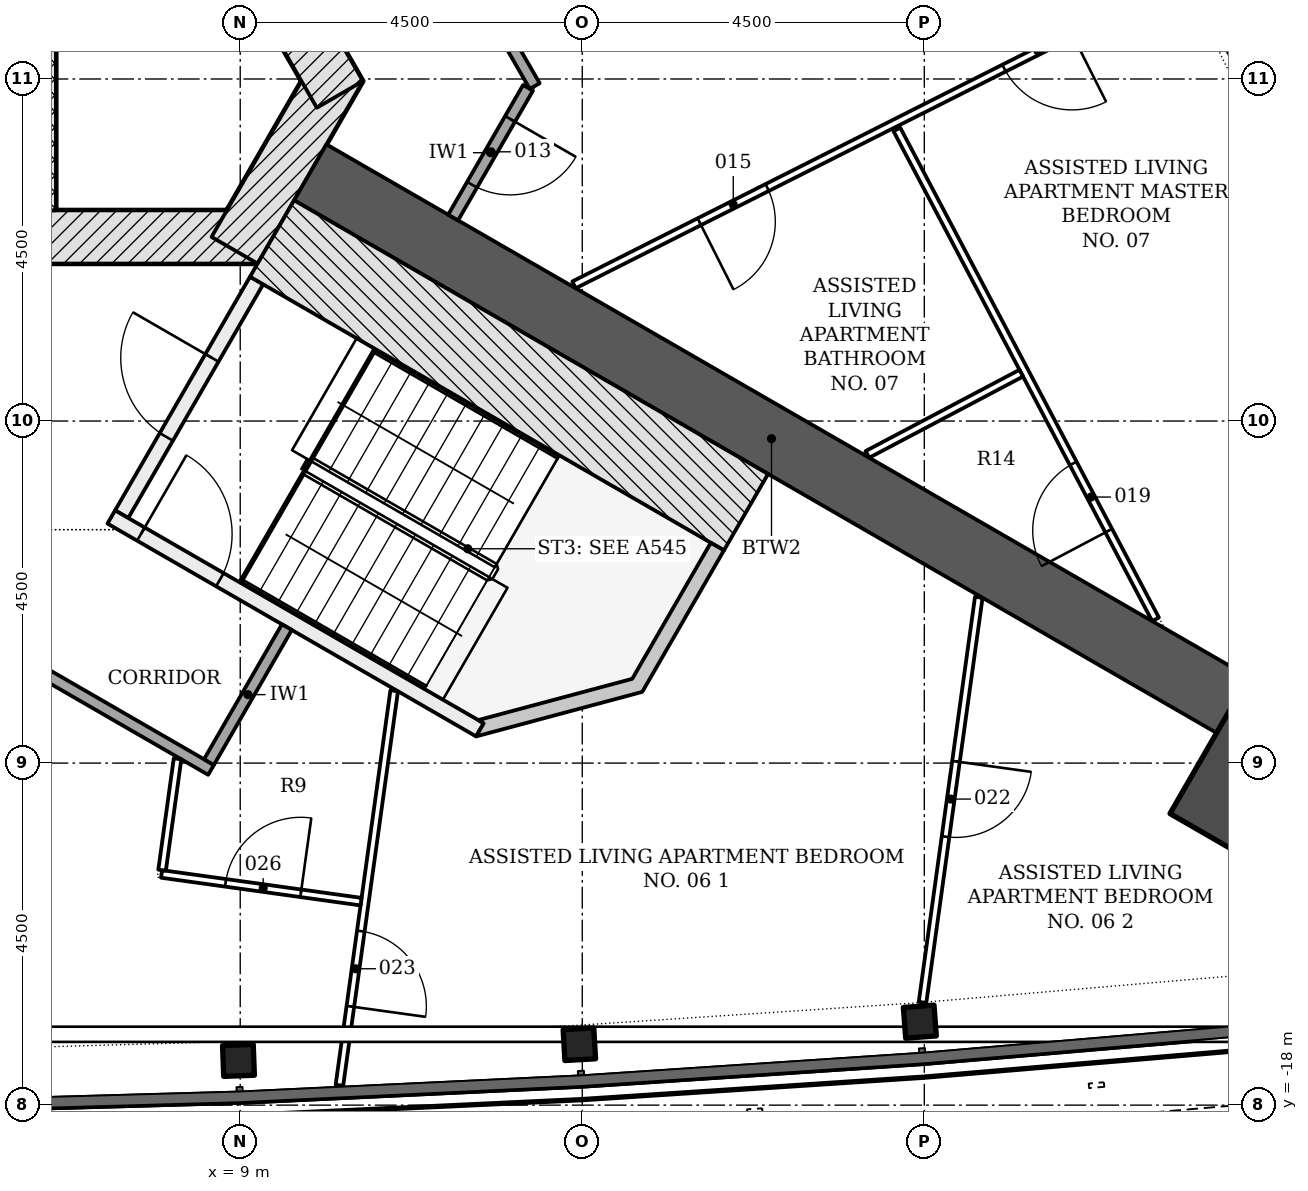
"""IFC4 building model, lengths in metres.
Left out: names, types, materials, properties, quantities, classifications, styles, units other than length and angle.
Written with IfcOpenShell. Run it as: python <this file> out.ifc"""

import sys

from ifc_helpers import new_model, si_unit, direction, frame, frame_2d, origin, origin_2d, place, context, subcontext, project, spatial, polyline, rectangle, i_section, outline, extrude, element, fill, save


model = new_model("IFC4")
c1 = context("Model", 3, precision=1e-05, world=origin(), true_north=direction((0.0, 1.0)))
c2 = subcontext(c1, "Body", "Model", "MODEL_VIEW")
j1 = project(units=[si_unit("LENGTHUNIT", "METRE"), si_unit("PLANEANGLEUNIT", "RADIAN")], contexts=[c1])
p1 = place(None, origin())
s1 = spatial("IfcSite", under=j1, at=p1, CompositionType="ELEMENT")
p2 = place(p1, origin())
s2 = spatial("IfcBuilding", under=s1, at=p2, CompositionType="ELEMENT")
p3 = place(p2, frame((0.0, 0.0, 45.6)))
s3 = spatial("IfcBuildingStorey", under=s2, at=p3, CompositionType="ELEMENT", Elevation=45.6)
p4 = place(p3, frame((-9.229, -6.578, -0.2), z_axis=(0.0, 0.0, 1.0), x_axis=(1.0, 0.0, 0.0)))
e1 = element("IfcWall", 1, at=p4, inside=s3, PredefinedType="SHEAR", context=c2, shape_type="SweptSolid", body=[
    extrude(rectangle(XDim=18.458, YDim=0.7, at=frame_2d((9.229, 0.0))), origin(), (0.0, 0.0, 1.0), 3.6),
])
p5 = place(p4, frame((3.304, 0.0, 0.2)))
e2 = element("IfcOpeningElement", 2, at=p5, cuts=e1, PredefinedType="OPENING", context=c2, shape_type="SweptSolid", body=[
    extrude(rectangle(XDim=1.1, YDim=2.1, at=frame_2d((0.55, 1.05))), frame((0.0, 0.36, 0.0), z_axis=(0.0, -1.0, 0.0), x_axis=(1.0, 0.0, 0.0)), (0.0, 0.0, 1.0), 0.72),
])
p6 = place(p4, frame((5.454, 0.0, 0.2)))
e3 = element("IfcOpeningElement", 3, at=p6, cuts=e1, PredefinedType="OPENING", context=c2, shape_type="SweptSolid", body=[
    extrude(rectangle(XDim=1.1, YDim=2.1, at=frame_2d((0.55, 1.05))), frame((0.0, 0.36, 0.0), z_axis=(0.0, -1.0, 0.0), x_axis=(1.0, 0.0, 0.0)), (0.0, 0.0, 1.0), 0.72),
])
p7 = place(p4, frame((7.604, 0.0, 0.2)))
e4 = element("IfcOpeningElement", 4, at=p7, cuts=e1, PredefinedType="OPENING", context=c2, shape_type="SweptSolid", body=[
    extrude(rectangle(XDim=1.1, YDim=2.1, at=frame_2d((0.55, 1.05))), frame((0.0, 0.36, 0.0), z_axis=(0.0, -1.0, 0.0), x_axis=(1.0, 0.0, 0.0)), (0.0, 0.0, 1.0), 0.72),
])
p8 = place(p4, frame((9.754, 0.0, 0.2)))
e5 = element("IfcOpeningElement", 5, at=p8, cuts=e1, PredefinedType="OPENING", context=c2, shape_type="SweptSolid", body=[
    extrude(rectangle(XDim=1.1, YDim=2.1, at=frame_2d((0.55, 1.05))), frame((0.0, 0.36, 0.0), z_axis=(0.0, -1.0, 0.0), x_axis=(1.0, 0.0, 0.0)), (0.0, 0.0, 1.0), 0.72),
])
p9 = place(p4, frame((11.904, 0.0, 0.2)))
e6 = element("IfcOpeningElement", 6, at=p9, cuts=e1, PredefinedType="OPENING", context=c2, shape_type="SweptSolid", body=[
    extrude(rectangle(XDim=1.1, YDim=2.1, at=frame_2d((0.55, 1.05))), frame((0.0, 0.36, 0.0), z_axis=(0.0, -1.0, 0.0), x_axis=(1.0, 0.0, 0.0)), (0.0, 0.0, 1.0), 0.72),
])
p10 = place(p4, frame((14.054, 0.0, 0.2)))
e7 = element("IfcOpeningElement", 7, at=p10, cuts=e1, PredefinedType="OPENING", context=c2, shape_type="SweptSolid", body=[
    extrude(rectangle(XDim=1.1, YDim=2.1, at=frame_2d((0.55, 1.05))), frame((0.0, 0.36, 0.0), z_axis=(0.0, -1.0, 0.0), x_axis=(1.0, 0.0, 0.0)), (0.0, 0.0, 1.0), 0.72),
])
p11 = place(p4, frame((1.029, 0.0, 0.2)))
e8 = element("IfcOpeningElement", 8, at=p11, cuts=e1, PredefinedType="OPENING", context=c2, shape_type="SweptSolid", body=[
    extrude(rectangle(XDim=1.0, YDim=2.1, at=frame_2d((0.5, 1.05))), frame((0.0, 0.36, 0.0), z_axis=(0.0, -1.0, 0.0), x_axis=(1.0, 0.0, 0.0)), (0.0, 0.0, 1.0), 0.72),
])
p12 = place(p3, frame((8.926, -6.753, -0.2), z_axis=(0.0, 0.0, 1.0), x_axis=(0.500042739161, 0.866000726912, 0.0)))
e9 = element("IfcWall", 9, at=p12, inside=s3, PredefinedType="SHEAR", context=c2, shape_type="SweptSolid", body=[
    extrude(rectangle(XDim=2.771, YDim=0.7, at=frame_2d((1.386, 0.0))), origin(), (0.0, 0.0, 1.0), 3.6),
])
p13 = place(p3, frame((10.311, -4.703, -0.2), z_axis=(0.0, 0.0, 1.0), x_axis=(-0.500001446645, 0.866024568562, 0.0)))
e10 = element("IfcWall", 10, at=p13, inside=s3, PredefinedType="SHEAR", context=c2, shape_type="SweptSolid", body=[
    extrude(rectangle(XDim=18.458, YDim=0.7, at=frame_2d((9.229, 0.0))), origin(), (0.0, 0.0, 1.0), 3.6),
])
p14 = place(p13, frame((10.5, 0.0, 0.2)))
e11 = element("IfcOpeningElement", 11, at=p14, cuts=e10, PredefinedType="OPENING", context=c2, shape_type="SweptSolid", body=[
    extrude(rectangle(XDim=1.0, YDim=2.1, at=frame_2d((0.5, 1.05))), frame((0.0, 0.36, 0.0), z_axis=(0.0, -1.0, 0.0), x_axis=(1.0, 0.0, 0.0)), (0.0, 0.0, 1.0), 0.72),
])
p15 = place(p13, frame((4.877, 0.0, 0.2)))
e12 = element("IfcOpeningElement", 12, at=p15, cuts=e10, PredefinedType="OPENING", context=c2, shape_type="SweptSolid", body=[
    extrude(rectangle(XDim=0.9, YDim=2.1, at=frame_2d((0.45, 1.05))), frame((0.0, 0.36, 0.0), z_axis=(0.0, -1.0, 0.0), x_axis=(1.0, 0.0, 0.0)), (0.0, 0.0, 1.0), 0.72),
])
p16 = place(p13, frame((14.452, 0.0, 0.2)))
e13 = element("IfcOpeningElement", 13, at=p16, cuts=e10, PredefinedType="OPENING", context=c2, shape_type="SweptSolid", body=[
    extrude(rectangle(XDim=0.9, YDim=2.1, at=frame_2d((0.45, 1.05))), frame((0.0, 0.36, 0.0), z_axis=(0.0, -1.0, 0.0), x_axis=(1.0, 0.0, 0.0)), (0.0, 0.0, 1.0), 0.72),
])
p17 = place(p3, frame((9.922, -5.728, -0.2), z_axis=(0.0, 0.0, 1.0), x_axis=(0.866021666006, -0.500006473966, 0.0)))
e14 = element("IfcWall", 14, at=p17, inside=s3, PredefinedType="SHEAR", context=c2, shape_type="SweptSolid", body=[
    extrude(rectangle(XDim=14.013, YDim=0.85, at=frame_2d((7.007, 0.0))), origin(), (0.0, 0.0, 1.0), 3.6),
])
p18 = place(p3, frame((23.487, -13.56, -0.2), z_axis=(0.0, 0.0, 1.0), x_axis=(0.866025403784, -0.5, 0.0)))
e15 = element("IfcColumn", 15, at=p18, inside=s3, PredefinedType="COLUMN", context=c2, shape_type="SweptSolid", body=[
    extrude(rectangle(XDim=3.3, YDim=3.3, at=origin_2d()), origin(), (0.0, 0.0, 1.0), 3.6),
])
for number, where, z_axis, x_axis in (
    (16, (8.977, -17.411, -0.2), (0.0, 0.0, 1.0), (0.999, 0.038, 0.0)),
    (17, (13.462, -17.199, -0.2), (0.0, 0.0, 1.0), (0.998, 0.057, 0.0)),
    (18, (17.941, -16.902, -0.2), (0.0, 0.0, 1.0), (0.997, 0.076, 0.0)),
):
    element("IfcColumn", number, at=place(p3, frame(where, z_axis=z_axis, x_axis=x_axis)), inside=s3, PredefinedType="COLUMN", context=c2, shape_type="SweptSolid", body=[
        extrude(i_section(OverallWidth=0.404, OverallDepth=0.406, WebThickness=0.027, FlangeThickness=0.044, FilletRadius=0.015, at=origin_2d()), origin(), (0.0, 0.0, 1.0), 3.6),
    ])
p19 = place(p3, frame((6.45, -6.228, -0.2), z_axis=(0.0, 0.0, 1.0), x_axis=(0.0, 1.0, 0.0)))
e19 = element("IfcWall", 19, at=p19, inside=s3, PredefinedType="PARTITIONING", context=c2, shape_type="SweptSolid", body=[
    extrude(rectangle(XDim=2.5, YDim=0.25, at=frame_2d((1.25, 0.0))), origin(), (0.0, 0.0, 1.0), 3.6),
])
p20 = place(p3, frame((7.44, -10.226, -0.2), z_axis=(0.0, 0.0, 1.0), x_axis=(0.500022077904, 0.866012656725, 0.0)))
e20 = element("IfcWall", 20, at=p20, inside=s3, PredefinedType="SHEAR", context=c2, shape_type="SweptSolid", body=[
    extrude(rectangle(XDim=3.55, YDim=0.2, at=frame_2d((1.775, 0.0))), origin(), (0.0, 0.0, 1.0), 3.6),
])
p21 = place(p20, frame((1.175, 0.0, 0.2)))
e21 = element("IfcOpeningElement", 21, at=p21, cuts=e20, PredefinedType="OPENING", context=c2, shape_type="SweptSolid", body=[
    extrude(rectangle(XDim=1.2, YDim=2.1, at=frame_2d((0.6, 1.05))), frame((0.0, 0.11, 0.0), z_axis=(0.0, -1.0, 0.0), x_axis=(1.0, 0.0, 0.0)), (0.0, 0.0, 1.0), 0.22),
])
p22 = place(p3, frame((7.304, -10.262, -0.2), z_axis=(0.0, 0.0, 1.0), x_axis=(0.866026594901, -0.49999793692, 0.0)))
e22 = element("IfcWall", 22, at=p22, inside=s3, PredefinedType="SHEAR", context=c2, shape_type="SweptSolid", body=[
    extrude(rectangle(XDim=5.6, YDim=0.2, at=frame_2d((2.8, 0.0))), origin(), (0.0, 0.0, 1.0), 3.6),
])
p23 = place(p22, frame((0.45, 0.0, 0.2)))
e23 = element("IfcOpeningElement", 23, at=p23, cuts=e22, PredefinedType="OPENING", context=c2, shape_type="SweptSolid", body=[
    extrude(rectangle(XDim=1.2, YDim=2.1, at=frame_2d((0.6, 1.05))), frame((0.0, 0.11, 0.0), z_axis=(0.0, -1.0, 0.0), x_axis=(1.0, 0.0, 0.0)), (0.0, 0.0, 1.0), 0.22),
])
p24 = place(p3, frame((9.419, -6.599, -0.2), z_axis=(0.0, 0.0, 1.0), x_axis=(0.866033125095, -0.499986626058, 0.0)))
e24 = element("IfcWall", 24, at=p24, inside=s3, PredefinedType="SHEAR", context=c2, shape_type="SweptSolid", body=[
    extrude(rectangle(XDim=7.2, YDim=1.161, at=frame_2d((3.6, 0.0))), origin(), (0.0, 0.0, 1.0), 3.6),
])
p25 = place(p3, frame((0.0, 0.0, -0.2)))
e25 = element("IfcWall", 25, at=p25, inside=s3, PredefinedType="SHEAR", context=c2, shape_type="SweptSolid", body=[
    extrude(outline(polyline([(12.104, -13.149), (14.289, -12.563), (15.364, -10.701), (15.191, -10.601), (14.157, -12.392), (12.132, -12.934), (12.204, -12.976), (12.204, -12.976), (12.204, -12.976), (12.204, -12.976), (12.204, -12.976), (12.204, -12.976), (12.204, -12.976), (12.204, -12.976), (12.204, -12.976), (12.204, -12.976), (12.204, -12.976), (12.204, -12.976), (12.204, -12.976), (12.204, -12.976), (12.204, -12.976), (12.204, -12.976), (12.204, -12.976), (12.104, -13.149)])), origin(), (0.0, 0.0, 1.0), 3.6),
])
p26 = place(p3, frame((5.346, 8.446, 0.0), z_axis=(0.0, 0.0, 1.0), x_axis=(0.500008781656, -0.866020333634, 0.0)))
e26 = element("IfcWall", 26, at=p26, inside=s3, PredefinedType="PARTITIONING", context=c2, shape_type="SweptSolid", body=[
    extrude(rectangle(XDim=15.057, YDim=0.15, at=frame_2d((7.528, 0.0))), origin(), (0.0, 0.0, 1.0), 2.778),
])
p27 = place(p26, frame((9.446, 0.0, 0.0)))
e27 = element("IfcOpeningElement", 27, at=p27, cuts=e26, PredefinedType="OPENING", context=c2, shape_type="SweptSolid", body=[
    extrude(rectangle(XDim=1.0, YDim=2.1, at=frame_2d((0.5, 1.05))), frame((0.0, 0.085, 0.0), z_axis=(0.0, -1.0, 0.0), x_axis=(1.0, 0.0, 0.0)), (0.0, 0.0, 1.0), 0.17),
])
p28 = place(p26, frame((1.892, 0.0, 0.0)))
e28 = element("IfcOpeningElement", 28, at=p28, cuts=e26, PredefinedType="OPENING", context=c2, shape_type="SweptSolid", body=[
    extrude(rectangle(XDim=1.0, YDim=2.1, at=frame_2d((0.5, 1.05))), frame((0.0, 0.085, 0.0), z_axis=(0.0, -1.0, 0.0), x_axis=(1.0, 0.0, 0.0)), (0.0, 0.0, 1.0), 0.17),
])
p29 = place(p3, frame((8.616, -13.589, 0.0), z_axis=(0.0, 0.0, 1.0), x_axis=(-0.866039313704, 0.499975906538, 0.0)))
e29 = element("IfcWall", 29, at=p29, inside=s3, PredefinedType="PARTITIONING", context=c2, shape_type="SweptSolid", body=[
    extrude(rectangle(XDim=5.892, YDim=0.15, at=frame_2d((2.946, 0.0))), origin(), (0.0, 0.0, 1.0), 2.778),
])
p30 = place(p29, frame((2.649, 0.0, 0.0)))
e30 = element("IfcOpeningElement", 30, at=p30, cuts=e29, PredefinedType="OPENING", context=c2, shape_type="SweptSolid", body=[
    extrude(rectangle(XDim=1.0, YDim=2.1, at=frame_2d((0.5, 1.05))), frame((0.0, 0.085, 0.0), z_axis=(0.0, -1.0, 0.0), x_axis=(1.0, 0.0, 0.0)), (0.0, 0.0, 1.0), 0.17),
])
p31 = place(p3, frame((8.589, -13.487, 0.0), z_axis=(0.0, 0.0, 1.0), x_axis=(0.499956128963, 0.866050731258, 0.0)))
e31 = element("IfcWall", 31, at=p31, inside=s3, PredefinedType="PARTITIONING", context=c2, shape_type="SweptSolid", body=[
    extrude(rectangle(XDim=2.05, YDim=0.15, at=frame_2d((1.025, 0.0))), origin(), (0.0, 0.0, 1.0), 2.923),
])
p32 = place(p3, frame((12.786, -4.617, 0.0), z_axis=(0.0, 0.0, 1.0), x_axis=(-0.500058665202, -0.865991530765, 0.0)))
e32 = element("IfcWall", 32, at=p32, inside=s3, PredefinedType="PARTITIONING", context=c2, shape_type="SweptSolid", body=[
    extrude(rectangle(XDim=1.969, YDim=0.15, at=frame_2d((0.985, 0.0))), origin(), (0.0, 0.0, 1.0), 3.4),
])
p33 = place(p32, frame((0.471, 0.0, 0.0)))
e33 = element("IfcOpeningElement", 33, at=p33, cuts=e32, PredefinedType="OPENING", context=c2, shape_type="SweptSolid", body=[
    extrude(rectangle(XDim=1.0, YDim=2.1, at=frame_2d((0.5, 1.05))), frame((0.0, 0.085, 0.0), z_axis=(0.0, -1.0, 0.0), x_axis=(1.0, 0.0, 0.0)), (0.0, 0.0, 1.0), 0.17),
])
p34 = place(p3, frame((21.402, -3.171, 0.0), z_axis=(0.0, 0.0, 1.0), x_axis=(-0.892974760713, -0.450106739263, 0.0)))
e34 = element("IfcWall", 34, at=p34, inside=s3, PredefinedType="PARTITIONING", context=c2, shape_type="SweptSolid", body=[
    extrude(rectangle(XDim=8.971, YDim=0.1, at=frame_2d((4.486, 0.0))), origin(), (0.0, 0.0, 1.0), 2.847),
])
p35 = place(p34, frame((6.125, 0.0, 0.0)))
e35 = element("IfcOpeningElement", 35, at=p35, cuts=e34, PredefinedType="OPENING", context=c2, shape_type="SweptSolid", body=[
    extrude(rectangle(XDim=1.0, YDim=2.1, at=frame_2d((0.5, 1.05))), frame((0.0, 0.06, 0.0), z_axis=(0.0, -1.0, 0.0), x_axis=(1.0, 0.0, 0.0)), (0.0, 0.0, 1.0), 0.12),
])
p36 = place(p34, frame((1.635, 0.0, 0.0)))
e36 = element("IfcOpeningElement", 36, at=p36, cuts=e34, PredefinedType="OPENING", context=c2, shape_type="SweptSolid", body=[
    extrude(rectangle(XDim=1.0, YDim=2.1, at=frame_2d((0.5, 1.05))), frame((0.0, 0.06, 0.0), z_axis=(0.0, -1.0, 0.0), x_axis=(1.0, 0.0, 0.0)), (0.0, 0.0, 1.0), 0.12),
])
p37 = place(p3, frame((21.042, -11.609, 0.0), z_axis=(0.0, 0.0, 1.0), x_axis=(-0.466893242862, 0.884313688557, 0.0)))
e37 = element("IfcWall", 37, at=p37, inside=s3, PredefinedType="PARTITIONING", context=c2, shape_type="SweptSolid", body=[
    extrude(rectangle(XDim=7.289, YDim=0.1, at=frame_2d((3.645, 0.0))), origin(), (0.0, 0.0, 1.0), 2.847),
])
p38 = place(p37, frame((1.319, 0.0, 0.0)))
e38 = element("IfcOpeningElement", 38, at=p38, cuts=e37, PredefinedType="OPENING", context=c2, shape_type="SweptSolid", body=[
    extrude(rectangle(XDim=1.0, YDim=2.1, at=frame_2d((0.5, 1.05))), frame((0.0, 0.06, 0.0), z_axis=(0.0, -1.0, 0.0), x_axis=(1.0, 0.0, 0.0)), (0.0, 0.0, 1.0), 0.12),
])
p39 = place(p3, frame((18.717, -11.319, 0.0), z_axis=(0.0, 0.0, 1.0), x_axis=(-0.13752632962, -0.990498111387, 0.0)))
e39 = element("IfcWall", 39, at=p39, inside=s3, PredefinedType="PARTITIONING", context=c2, shape_type="SweptSolid", body=[
    extrude(rectangle(XDim=5.381, YDim=0.1, at=frame_2d((2.69, 0.0))), origin(), (0.0, 0.0, 1.0), 2.923),
])
p40 = place(p39, frame((2.18, 0.0, 0.0)))
e40 = element("IfcOpeningElement", 40, at=p40, cuts=e39, PredefinedType="OPENING", context=c2, shape_type="SweptSolid", body=[
    extrude(rectangle(XDim=1.0, YDim=2.1, at=frame_2d((0.5, 1.05))), frame((0.0, 0.06, 0.0), z_axis=(0.0, -1.0, 0.0), x_axis=(1.0, 0.0, 0.0)), (0.0, 0.0, 1.0), 0.12),
])
p41 = place(p3, frame((11.026, -12.548, 0.0), z_axis=(0.0, 0.0, 1.0), x_axis=(-0.137526474089, -0.990498091328, 0.0)))
e41 = element("IfcWall", 41, at=p41, inside=s3, PredefinedType="PARTITIONING", context=c2, shape_type="SweptSolid", body=[
    extrude(rectangle(XDim=5.24, YDim=0.1, at=frame_2d((2.62, 0.0))), origin(), (0.0, 0.0, 1.0), 2.974),
])
p42 = place(p41, frame((3.192, 0.0, 0.0)))
e42 = element("IfcOpeningElement", 42, at=p42, cuts=e41, PredefinedType="OPENING", context=c2, shape_type="SweptSolid", body=[
    extrude(rectangle(XDim=1.0, YDim=2.1, at=frame_2d((0.5, 1.05))), frame((0.0, 0.06, 0.0), z_axis=(0.0, -1.0, 0.0), x_axis=(1.0, 0.0, 0.0)), (0.0, 0.0, 1.0), 0.12),
])
p43 = place(p3, frame((7.965, -14.958, 0.0), z_axis=(0.0, 0.0, 1.0), x_axis=(0.990494714026, -0.137550796023, 0.0)))
e43 = element("IfcWall", 43, at=p43, inside=s3, PredefinedType="PARTITIONING", context=c2, shape_type="SweptSolid", body=[
    extrude(rectangle(XDim=2.65, YDim=0.1, at=frame_2d((1.325, 0.0))), origin(), (0.0, 0.0, 1.0), 2.923),
])
p44 = place(p43, frame((0.85, 0.0, 0.0)))
e44 = element("IfcOpeningElement", 44, at=p44, cuts=e43, PredefinedType="OPENING", context=c2, shape_type="SweptSolid", body=[
    extrude(rectangle(XDim=1.0, YDim=2.1, at=frame_2d((0.5, 1.05))), frame((0.0, 0.06, 0.0), z_axis=(0.0, -1.0, 0.0), x_axis=(1.0, 0.0, 0.0)), (0.0, 0.0, 1.0), 0.12),
])
p45 = place(p3, frame((19.275, -8.37, 0.0), z_axis=(0.0, 0.0, 1.0), x_axis=(-0.884285648232, -0.466946348451, 0.0)))
e45 = element("IfcWall", 45, at=p45, inside=s3, PredefinedType="PARTITIONING", context=c2, shape_type="SweptSolid", body=[
    extrude(rectangle(XDim=2.289, YDim=0.1, at=frame_2d((1.144, 0.0))), origin(), (0.0, 0.0, 1.0), 3.4),
])
p46 = place(p3, frame((8.176, -13.443, 0.0), z_axis=(0.0, 0.0, 1.0), x_axis=(-0.137586354535, -0.990489775336, 0.0)))
e46 = element("IfcWall", 46, at=p46, inside=s3, PredefinedType="PARTITIONING", context=c2, shape_type="SweptSolid", body=[
    extrude(rectangle(XDim=1.48, YDim=0.1, at=frame_2d((0.74, 0.0))), origin(), (0.0, 0.0, 1.0), 3.4),
])
p47 = place(p21, origin())
e47 = element("IfcDoor", 47, at=p47, inside=s3, OperationType="SINGLE_SWING_RIGHT", PredefinedType="DOOR", context=c2, shape_type="SweptSolid", body=[
    extrude(rectangle(XDim=1.2, YDim=2.1, at=frame_2d((0.6, 1.05))), frame((0.0, 0.025, 0.0), z_axis=(0.0, -1.0, 0.0), x_axis=(1.0, 0.0, 0.0)), (0.0, 0.0, 1.0), 0.05),
])
fill(e21, e47)
p48 = place(p23, origin())
e48 = element("IfcDoor", 48, at=p48, inside=s3, OperationType="SINGLE_SWING_LEFT", PredefinedType="DOOR", context=c2, shape_type="SweptSolid", body=[
    extrude(rectangle(XDim=1.2, YDim=2.1, at=frame_2d((0.6, 1.05))), frame((0.0, 0.025, 0.0), z_axis=(0.0, -1.0, 0.0), x_axis=(1.0, 0.0, 0.0)), (0.0, 0.0, 1.0), 0.05),
])
fill(e23, e48)
p49 = place(p33, origin())
e49 = element("IfcDoor", 49, at=p49, inside=s3, OperationType="SINGLE_SWING_LEFT", PredefinedType="DOOR", context=c2, shape_type="SweptSolid", body=[
    extrude(rectangle(XDim=1.0, YDim=2.1, at=frame_2d((0.5, 1.05))), frame((0.0, 0.025, 0.0), z_axis=(0.0, -1.0, 0.0), x_axis=(1.0, 0.0, 0.0)), (0.0, 0.0, 1.0), 0.05),
])
fill(e33, e49)
p50 = place(p35, origin())
e50 = element("IfcDoor", 50, at=p50, inside=s3, OperationType="SINGLE_SWING_RIGHT", PredefinedType="DOOR", context=c2, shape_type="SweptSolid", body=[
    extrude(rectangle(XDim=1.0, YDim=2.1, at=frame_2d((0.5, 1.05))), frame((0.0, 0.025, 0.0), z_axis=(0.0, -1.0, 0.0), x_axis=(1.0, 0.0, 0.0)), (0.0, 0.0, 1.0), 0.05),
])
fill(e35, e50)
p51 = place(p36, origin())
e51 = element("IfcDoor", 51, at=p51, inside=s3, OperationType="SINGLE_SWING_LEFT", PredefinedType="DOOR", context=c2, shape_type="SweptSolid", body=[
    extrude(rectangle(XDim=1.0, YDim=2.1, at=frame_2d((0.5, 1.05))), frame((0.0, 0.025, 0.0), z_axis=(0.0, -1.0, 0.0), x_axis=(1.0, 0.0, 0.0)), (0.0, 0.0, 1.0), 0.05),
])
fill(e36, e51)
p52 = place(p38, origin())
e52 = element("IfcDoor", 52, at=p52, inside=s3, OperationType="SINGLE_SWING_LEFT", PredefinedType="DOOR", context=c2, shape_type="SweptSolid", body=[
    extrude(rectangle(XDim=1.0, YDim=2.1, at=frame_2d((0.5, 1.05))), frame((0.0, 0.025, 0.0), z_axis=(0.0, -1.0, 0.0), x_axis=(1.0, 0.0, 0.0)), (0.0, 0.0, 1.0), 0.05),
])
fill(e38, e52)
p53 = place(p40, origin())
e53 = element("IfcDoor", 53, at=p53, inside=s3, OperationType="SINGLE_SWING_LEFT", PredefinedType="DOOR", context=c2, shape_type="SweptSolid", body=[
    extrude(rectangle(XDim=1.0, YDim=2.1, at=frame_2d((0.5, 1.05))), frame((0.0, 0.025, 0.0), z_axis=(0.0, -1.0, 0.0), x_axis=(1.0, 0.0, 0.0)), (0.0, 0.0, 1.0), 0.05),
])
fill(e40, e53)
p54 = place(p42, origin())
e54 = element("IfcDoor", 54, at=p54, inside=s3, OperationType="SINGLE_SWING_RIGHT", PredefinedType="DOOR", context=c2, shape_type="SweptSolid", body=[
    extrude(rectangle(XDim=1.0, YDim=2.1, at=frame_2d((0.5, 1.05))), frame((0.0, 0.025, 0.0), z_axis=(0.0, -1.0, 0.0), x_axis=(1.0, 0.0, 0.0)), (0.0, 0.0, 1.0), 0.05),
])
fill(e42, e54)
p55 = place(p44, origin())
e55 = element("IfcDoor", 55, at=p55, inside=s3, OperationType="SINGLE_SWING_RIGHT", PredefinedType="DOOR", context=c2, shape_type="SweptSolid", body=[
    extrude(rectangle(XDim=1.0, YDim=2.1, at=frame_2d((0.5, 1.05))), frame((0.0, 0.025, 0.0), z_axis=(0.0, -1.0, 0.0), x_axis=(1.0, 0.0, 0.0)), (0.0, 0.0, 1.0), 0.05),
])
fill(e44, e55)
save(model, sys.argv[1])
